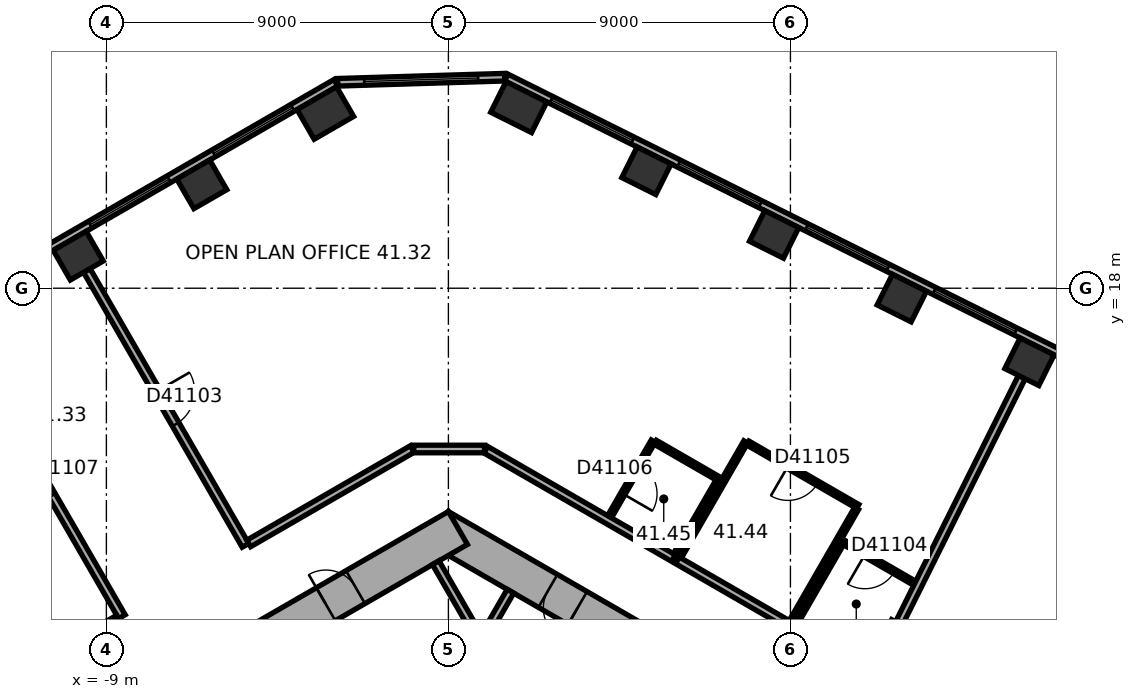
"""IFC4 building model, lengths in metres.
Left out: names, types, materials, properties, quantities, classifications, styles, units other than length and angle.
Written with IfcOpenShell. Run it as: python <this file> out.ifc"""

import sys

from ifc_helpers import new_model, si_unit, direction, frame, frame_2d, origin, origin_2d, place, context, subcontext, project, spatial, rectangle, extrude, element, fill, save


model = new_model("IFC4")
c1 = context("Model", 3, precision=1e-05, world=origin(), true_north=direction((0.0, 1.0)))
c2 = subcontext(c1, "Body", "Model", "MODEL_VIEW")
j1 = project(units=[si_unit("LENGTHUNIT", "METRE"), si_unit("PLANEANGLEUNIT", "RADIAN")], contexts=[c1])
p1 = place(None, origin())
s1 = spatial("IfcSite", under=j1, at=p1, CompositionType="ELEMENT")
p2 = place(p1, origin())
s2 = spatial("IfcBuilding", under=s1, at=p2, CompositionType="ELEMENT")
p3 = place(p2, frame((0.0, 0.0, 168.8)))
s3 = spatial("IfcBuildingStorey", under=s2, at=p3, CompositionType="ELEMENT", Elevation=168.8)
for number, where, z_axis, x_axis in (
    (1, (15.29, 16.065, 0.0), (0.0, 0.0, 1.0), (-0.895, 0.446, 0.0)),
    (2, (11.931, 17.74, 0.0), (0.0, 0.0, 1.0), (-0.895, 0.446, 0.0)),
    (3, (8.571, 19.416, 0.0), (0.0, 0.0, 1.0), (-0.895, 0.446, 0.0)),
    (4, (5.211, 21.091, 0.0), (0.0, 0.0, 1.0), (-0.895, 0.446, 0.0)),
):
    element("IfcColumn", number, at=place(p3, frame(where, z_axis=z_axis, x_axis=x_axis)), inside=s3, PredefinedType="COLUMN", context=c2, shape_type="SweptSolid", body=[
        extrude(rectangle(XDim=1.0, YDim=0.9, at=origin_2d()), origin(), (0.0, 0.0, 1.0), 3.7),
    ])
for number, where, z_axis, x_axis in (
    (5, (1.852, 22.766, 0.0), (0.0, 0.0, 1.0), (-0.895, 0.446, 0.0)),
    (6, (-3.238, 22.61, 0.0), (0.0, 0.0, 1.0), (-0.866, -0.5, 0.0)),
):
    element("IfcColumn", number, at=place(p3, frame(where, z_axis=z_axis, x_axis=x_axis)), inside=s3, PredefinedType="COLUMN", context=c2, shape_type="SweptSolid", body=[
        extrude(rectangle(XDim=1.2, YDim=0.9, at=origin_2d()), origin(), (0.0, 0.0, 1.0), 3.7),
    ])
for number, where, z_axis, x_axis in (
    (7, (-6.489, 20.733, 0.0), (0.0, 0.0, 1.0), (-0.866, -0.5, 0.0)),
    (8, (-9.74, 18.856, 0.0), (0.0, 0.0, 1.0), (-0.866, -0.5, 0.0)),
):
    element("IfcColumn", number, at=place(p3, frame(where, z_axis=z_axis, x_axis=x_axis)), inside=s3, PredefinedType="COLUMN", context=c2, shape_type="SweptSolid", body=[
        extrude(rectangle(XDim=1.0, YDim=0.9, at=origin_2d()), origin(), (0.0, 0.0, 1.0), 3.7),
    ])
p4 = place(p3, frame((10.25, 5.629, 0.0), z_axis=(0.0, 0.0, 1.0), x_axis=(-0.866022616891, 0.50000482701, 0.0)))
e9 = element("IfcWall", 9, at=p4, inside=s3, PredefinedType="SHEAR", context=c2, shape_type="SweptSolid", body=[
    extrude(rectangle(XDim=12.125, YDim=1.0, at=frame_2d((6.062, 0.0))), origin(), (0.0, 0.0, 1.0), 3.7),
])
p5 = place(p4, frame((4.012, 0.0, 0.0)))
e10 = element("IfcOpeningElement", 10, at=p5, cuts=e9, PredefinedType="OPENING", context=c2, shape_type="SweptSolid", body=[
    extrude(rectangle(XDim=0.9, YDim=2.1, at=frame_2d((0.45, 1.05))), frame((0.0, 0.51, 0.0), z_axis=(0.0, -1.0, 0.0), x_axis=(1.0, 0.0, 0.0)), (0.0, 0.0, 1.0), 1.02),
])
p6 = place(p4, frame((7.912, 0.0, 0.0)))
e11 = element("IfcOpeningElement", 11, at=p6, cuts=e9, PredefinedType="OPENING", context=c2, shape_type="SweptSolid", body=[
    extrude(rectangle(XDim=0.9, YDim=2.1, at=frame_2d((0.45, 1.05))), frame((0.0, 0.51, 0.0), z_axis=(0.0, -1.0, 0.0), x_axis=(1.0, 0.0, 0.0)), (0.0, 0.0, 1.0), 1.02),
])
p7 = place(p3, frame((0.25, 11.691, 0.0), z_axis=(0.0, 0.0, 1.0), x_axis=(-0.866022616891, -0.50000482701, 0.0)))
e12 = element("IfcWall", 12, at=p7, inside=s3, PredefinedType="SHEAR", context=c2, shape_type="SweptSolid", body=[
    extrude(rectangle(XDim=12.125, YDim=1.0, at=frame_2d((6.062, 0.0))), origin(), (0.0, 0.0, 1.0), 3.7),
])
p8 = place(p7, frame((6.262, 0.0, 0.0)))
e13 = element("IfcOpeningElement", 13, at=p8, cuts=e12, PredefinedType="OPENING", context=c2, shape_type="SweptSolid", body=[
    extrude(rectangle(XDim=1.5, YDim=2.1, at=frame_2d((0.75, 1.05))), frame((0.0, 0.51, 0.0), z_axis=(0.0, -1.0, 0.0), x_axis=(1.0, 0.0, 0.0)), (0.0, 0.0, 1.0), 1.02),
])
p9 = place(p7, frame((3.112, 0.0, 0.0)))
e14 = element("IfcOpeningElement", 14, at=p9, cuts=e12, PredefinedType="OPENING", context=c2, shape_type="SweptSolid", body=[
    extrude(rectangle(XDim=0.9, YDim=2.1, at=frame_2d((0.45, 1.05))), frame((0.0, 0.51, 0.0), z_axis=(0.0, -1.0, 0.0), x_axis=(1.0, 0.0, 0.0)), (0.0, 0.0, 1.0), 1.02),
])
p10 = place(p3, frame((19.464, 14.599, 0.0), z_axis=(0.0, 0.0, 1.0), x_axis=(-0.894935755043, 0.446195018289, 0.0)))
e15 = element("IfcWall", 15, at=p10, inside=s3, PredefinedType="STANDARD", context=c2, shape_type="SweptSolid", body=[
    extrude(rectangle(XDim=20.044, YDim=0.2, at=frame_2d((10.022, 0.0))), origin(), (0.0, 0.0, 1.0), 3.7),
])
p11 = place(p10, frame((1.313, 0.0, 0.9)))
e16 = element("IfcOpeningElement", 16, at=p11, cuts=e15, PredefinedType="OPENING", context=c2, shape_type="SweptSolid", body=[
    extrude(rectangle(XDim=2.4, YDim=2.0, at=frame_2d((1.2, 1.0))), frame((0.0, 0.11, 0.0), z_axis=(0.0, -1.0, 0.0), x_axis=(1.0, 0.0, 0.0)), (0.0, 0.0, 1.0), 0.22),
])
p12 = place(p10, frame((5.067, 0.0, 0.9)))
e17 = element("IfcOpeningElement", 17, at=p12, cuts=e15, PredefinedType="OPENING", context=c2, shape_type="SweptSolid", body=[
    extrude(rectangle(XDim=2.4, YDim=2.0, at=frame_2d((1.2, 1.0))), frame((0.0, 0.11, 0.0), z_axis=(0.0, -1.0, 0.0), x_axis=(1.0, 0.0, 0.0)), (0.0, 0.0, 1.0), 0.22),
])
p13 = place(p10, frame((8.821, 0.0, 0.9)))
e18 = element("IfcOpeningElement", 18, at=p13, cuts=e15, PredefinedType="OPENING", context=c2, shape_type="SweptSolid", body=[
    extrude(rectangle(XDim=2.4, YDim=2.0, at=frame_2d((1.2, 1.0))), frame((0.0, 0.11, 0.0), z_axis=(0.0, -1.0, 0.0), x_axis=(1.0, 0.0, 0.0)), (0.0, 0.0, 1.0), 0.22),
])
p14 = place(p10, frame((12.575, 0.0, 0.9)))
e19 = element("IfcOpeningElement", 19, at=p14, cuts=e15, PredefinedType="OPENING", context=c2, shape_type="SweptSolid", body=[
    extrude(rectangle(XDim=2.4, YDim=2.0, at=frame_2d((1.2, 1.0))), frame((0.0, 0.11, 0.0), z_axis=(0.0, -1.0, 0.0), x_axis=(1.0, 0.0, 0.0)), (0.0, 0.0, 1.0), 0.22),
])
p15 = place(p10, frame((16.329, 0.0, 0.9)))
e20 = element("IfcOpeningElement", 20, at=p15, cuts=e15, PredefinedType="OPENING", context=c2, shape_type="SweptSolid", body=[
    extrude(rectangle(XDim=2.4, YDim=2.0, at=frame_2d((1.2, 1.0))), frame((0.0, 0.11, 0.0), z_axis=(0.0, -1.0, 0.0), x_axis=(1.0, 0.0, 0.0)), (0.0, 0.0, 1.0), 0.22),
])
p16 = place(p3, frame((1.479, 23.553, 0.0), z_axis=(0.0, 0.0, 1.0), x_axis=(-0.999534786117, -0.03049936625, 0.0)))
e21 = element("IfcWall", 21, at=p16, inside=s3, PredefinedType="STANDARD", context=c2, shape_type="SweptSolid", body=[
    extrude(rectangle(XDim=4.395, YDim=0.2, at=frame_2d((2.197, 0.0))), origin(), (0.0, 0.0, 1.0), 3.7),
])
p17 = place(p16, frame((0.698, 0.0, 0.9)))
e22 = element("IfcOpeningElement", 22, at=p17, cuts=e21, PredefinedType="OPENING", context=c2, shape_type="SweptSolid", body=[
    extrude(rectangle(XDim=3.0, YDim=2.0, at=frame_2d((1.5, 1.0))), frame((0.0, 0.11, 0.0), z_axis=(0.0, -1.0, 0.0), x_axis=(1.0, 0.0, 0.0)), (0.0, 0.0, 1.0), 0.22),
])
p18 = place(p3, frame((-2.961, 23.405, 0.0), z_axis=(0.0, 0.0, 1.0), x_axis=(-0.866023315909, -0.500003616288, 0.0)))
e23 = element("IfcWall", 23, at=p18, inside=s3, PredefinedType="STANDARD", context=c2, shape_type="SweptSolid", body=[
    extrude(rectangle(XDim=20.044, YDim=0.2, at=frame_2d((10.022, 0.0))), origin(), (0.0, 0.0, 1.0), 3.7),
])
p19 = place(p18, frame((1.314, 0.0, 0.9)))
e24 = element("IfcOpeningElement", 24, at=p19, cuts=e23, PredefinedType="OPENING", context=c2, shape_type="SweptSolid", body=[
    extrude(rectangle(XDim=2.4, YDim=2.0, at=frame_2d((1.2, 1.0))), frame((0.0, 0.11, 0.0), z_axis=(0.0, -1.0, 0.0), x_axis=(1.0, 0.0, 0.0)), (0.0, 0.0, 1.0), 0.22),
])
p20 = place(p18, frame((5.069, 0.0, 0.9)))
e25 = element("IfcOpeningElement", 25, at=p20, cuts=e23, PredefinedType="OPENING", context=c2, shape_type="SweptSolid", body=[
    extrude(rectangle(XDim=2.4, YDim=2.0, at=frame_2d((1.2, 1.0))), frame((0.0, 0.11, 0.0), z_axis=(0.0, -1.0, 0.0), x_axis=(1.0, 0.0, 0.0)), (0.0, 0.0, 1.0), 0.22),
])
p21 = place(p18, frame((8.823, 0.0, 0.9)))
e26 = element("IfcOpeningElement", 26, at=p21, cuts=e23, PredefinedType="OPENING", context=c2, shape_type="SweptSolid", body=[
    extrude(rectangle(XDim=2.4, YDim=2.0, at=frame_2d((1.2, 1.0))), frame((0.0, 0.11, 0.0), z_axis=(0.0, -1.0, 0.0), x_axis=(1.0, 0.0, 0.0)), (0.0, 0.0, 1.0), 0.22),
])
p22 = place(p18, frame((12.577, 0.0, 0.9)))
e27 = element("IfcOpeningElement", 27, at=p22, cuts=e23, PredefinedType="OPENING", context=c2, shape_type="SweptSolid", body=[
    extrude(rectangle(XDim=2.4, YDim=2.0, at=frame_2d((1.2, 1.0))), frame((0.0, 0.11, 0.0), z_axis=(0.0, -1.0, 0.0), x_axis=(1.0, 0.0, 0.0)), (0.0, 0.0, 1.0), 0.22),
])
p23 = place(p18, frame((16.331, 0.0, 0.9)))
e28 = element("IfcOpeningElement", 28, at=p23, cuts=e23, PredefinedType="OPENING", context=c2, shape_type="SweptSolid", body=[
    extrude(rectangle(XDim=2.4, YDim=2.0, at=frame_2d((1.2, 1.0))), frame((0.0, 0.11, 0.0), z_axis=(0.0, -1.0, 0.0), x_axis=(1.0, 0.0, 0.0)), (0.0, 0.0, 1.0), 0.22),
])
p24 = place(p3, frame((0.532, 8.122, 0.0), z_axis=(0.0, 0.0, 1.0), x_axis=(0.500077893725, 0.86598042715, 0.0)))
e29 = element("IfcWall", 29, at=p24, inside=s3, PredefinedType="PARTITIONING", context=c2, shape_type="SweptSolid", body=[
    extrude(rectangle(XDim=2.2, YDim=0.2, at=frame_2d((1.1, 0.0))), origin(), (0.0, 0.0, 1.0), 3.42),
])
p25 = place(p3, frame((0.767, 8.872, 0.0), z_axis=(0.0, 0.0, 1.0), x_axis=(-0.499994660107, 0.866028486751, 0.0)))
e30 = element("IfcWall", 30, at=p25, inside=s3, PredefinedType="PARTITIONING", context=c2, shape_type="SweptSolid", body=[
    extrude(rectangle(XDim=2.2, YDim=0.2, at=frame_2d((1.1, 0.0))), origin(), (0.0, 0.0, 1.0), 3.42),
])
p26 = place(p3, frame((-12.766, 16.589, 0.0), z_axis=(0.0, 0.0, 1.0), x_axis=(0.500010139422, -0.866019549707, 0.0)))
e31 = element("IfcWall", 31, at=p26, inside=s3, PredefinedType="PARTITIONING", context=c2, shape_type="SweptSolid", body=[
    extrude(rectangle(XDim=8.35, YDim=0.2, at=frame_2d((4.175, 0.0))), origin(), (0.0, 0.0, 1.0), 3.42),
])
p27 = place(p26, frame((3.675, 0.0, 0.0)))
e32 = element("IfcOpeningElement", 32, at=p27, cuts=e31, PredefinedType="OPENING", context=c2, shape_type="SweptSolid", body=[
    extrude(rectangle(XDim=1.0, YDim=2.1, at=frame_2d((0.5, 1.05))), frame((0.0, 0.11, 0.0), z_axis=(0.0, -1.0, 0.0), x_axis=(1.0, 0.0, 0.0)), (0.0, 0.0, 1.0), 0.22),
])
p28 = place(p3, frame((-9.515, 18.466, 0.0), z_axis=(0.0, 0.0, 1.0), x_axis=(0.500010139422, -0.866019549707, 0.0)))
e33 = element("IfcWall", 33, at=p28, inside=s3, PredefinedType="PARTITIONING", context=c2, shape_type="SweptSolid", body=[
    extrude(rectangle(XDim=8.35, YDim=0.2, at=frame_2d((4.175, 0.0))), origin(), (0.0, 0.0, 1.0), 2.87),
])
p29 = place(p28, frame((3.675, 0.0, 0.0)))
e34 = element("IfcOpeningElement", 34, at=p29, cuts=e33, PredefinedType="OPENING", context=c2, shape_type="SweptSolid", body=[
    extrude(rectangle(XDim=1.0, YDim=2.1, at=frame_2d((0.5, 1.05))), frame((0.0, 0.11, 0.0), z_axis=(0.0, -1.0, 0.0), x_axis=(1.0, 0.0, 0.0)), (0.0, 0.0, 1.0), 0.22),
])
p30 = place(p3, frame((-8.678, 9.308, 0.0), z_axis=(0.0, 0.0, 1.0), x_axis=(-0.866000359435, -0.500043375578, 0.0)))
e35 = element("IfcWall", 35, at=p30, inside=s3, PredefinedType="PARTITIONING", context=c2, shape_type="SweptSolid", body=[
    extrude(rectangle(XDim=3.161, YDim=0.2, at=frame_2d((1.581, 0.0))), origin(), (0.0, 0.0, 1.0), 3.42),
])
p31 = place(p3, frame((-0.95, 13.77, 0.0), z_axis=(0.0, 0.0, 1.0), x_axis=(-0.866036689987, -0.499980451214, 0.0)))
e36 = element("IfcWall", 36, at=p31, inside=s3, PredefinedType="PARTITIONING", context=c2, shape_type="SweptSolid", body=[
    extrude(rectangle(XDim=4.969, YDim=0.2, at=frame_2d((2.485, 0.0))), origin(), (0.0, 0.0, 1.0), 3.42),
])
p32 = place(p3, frame((0.95, 13.77, 0.0), z_axis=(0.0, 0.0, 1.0), x_axis=(-1.0, 0.0, 0.0)))
e37 = element("IfcWall", 37, at=p32, inside=s3, PredefinedType="PARTITIONING", context=c2, shape_type="SweptSolid", body=[
    extrude(rectangle(XDim=1.86, YDim=0.2, at=frame_2d((0.93, 0.0))), origin(), (0.0, 0.0, 1.0), 3.42),
])
p33 = place(p3, frame((4.24, 11.986, 0.0), z_axis=(0.0, 0.0, 1.0), x_axis=(0.499952165731, 0.866053019151, 0.0)))
e38 = element("IfcWall", 38, at=p33, inside=s3, PredefinedType="PARTITIONING", context=c2, shape_type="SweptSolid", body=[
    extrude(rectangle(XDim=2.3, YDim=0.12, at=frame_2d((1.15, 0.0))), origin(), (0.0, 0.0, 1.0), 3.42),
])
p34 = place(p33, frame((0.7, 0.0, 0.0)))
e39 = element("IfcOpeningElement", 39, at=p34, cuts=e38, PredefinedType="OPENING", context=c2, shape_type="SweptSolid", body=[
    extrude(rectangle(XDim=0.9, YDim=2.1, at=frame_2d((0.45, 1.05))), frame((0.0, 0.07, 0.0), z_axis=(0.0, -1.0, 0.0), x_axis=(1.0, 0.0, 0.0)), (0.0, 0.0, 1.0), 0.14),
])
p35 = place(p3, frame((5.442, 13.948, 0.0), z_axis=(0.0, 0.0, 1.0), x_axis=(0.866043088465, -0.499969367985, 0.0)))
e40 = element("IfcWall", 40, at=p35, inside=s3, PredefinedType="PARTITIONING", context=c2, shape_type="SweptSolid", body=[
    extrude(rectangle(XDim=1.94, YDim=0.12, at=frame_2d((0.97, 0.0))), origin(), (0.0, 0.0, 1.0), 3.42),
])
p36 = place(p3, frame((5.922, 10.899, 0.0), z_axis=(0.0, 0.0, 1.0), x_axis=(-0.866031556924, 0.499989342298, 0.0)))
e41 = element("IfcWall", 41, at=p36, inside=s3, PredefinedType="PARTITIONING", context=c2, shape_type="SweptSolid", body=[
    extrude(rectangle(XDim=5.701, YDim=0.2, at=frame_2d((2.851, 0.0))), origin(), (0.0, 0.0, 1.0), 3.42),
])
p37 = place(p3, frame((6.076, 10.926, 0.0), z_axis=(0.0, 0.0, 1.0), x_axis=(0.500010275428, 0.866019471182, 0.0)))
e42 = element("IfcWall", 42, at=p37, inside=s3, PredefinedType="PARTITIONING", context=c2, shape_type="SweptSolid", body=[
    extrude(rectangle(XDim=3.5, YDim=0.12, at=frame_2d((1.75, 0.0))), origin(), (0.0, 0.0, 1.0), 3.42),
])
p38 = place(p3, frame((7.092, 12.926, 0.0), z_axis=(0.0, 0.0, 1.0), x_axis=(-0.500030632641, -0.866007717299, 0.0)))
e43 = element("IfcWall", 43, at=p38, inside=s3, PredefinedType="PARTITIONING", context=c2, shape_type="SweptSolid", body=[
    extrude(rectangle(XDim=2.24, YDim=0.12, at=frame_2d((1.12, 0.0))), origin(), (0.0, 0.0, 1.0), 3.42),
])
p39 = place(p3, frame((7.878, 13.927, 0.0), z_axis=(0.0, 0.0, 1.0), x_axis=(0.866021245731, -0.500007201891, 0.0)))
e44 = element("IfcWall", 44, at=p39, inside=s3, PredefinedType="PARTITIONING", context=c2, shape_type="SweptSolid", body=[
    extrude(rectangle(XDim=3.34, YDim=0.12, at=frame_2d((1.67, 0.0))), origin(), (0.0, 0.0, 1.0), 3.42),
])
p40 = place(p39, frame((1.22, 0.0, 0.0)))
e45 = element("IfcOpeningElement", 45, at=p40, cuts=e44, PredefinedType="OPENING", context=c2, shape_type="SweptSolid", body=[
    extrude(rectangle(XDim=0.9, YDim=2.1, at=frame_2d((0.45, 1.05))), frame((0.0, 0.07, 0.0), z_axis=(0.0, -1.0, 0.0), x_axis=(1.0, 0.0, 0.0)), (0.0, 0.0, 1.0), 0.14),
])
p41 = place(p3, frame((8.971, 9.139, 0.0), z_axis=(0.0, 0.0, 1.0), x_axis=(-0.866038511948, 0.499977295307, 0.0)))
e46 = element("IfcWall", 46, at=p41, inside=s3, PredefinedType="PARTITIONING", context=c2, shape_type="SweptSolid", body=[
    extrude(rectangle(XDim=3.4, YDim=0.2, at=frame_2d((1.7, 0.0))), origin(), (0.0, 0.0, 1.0), 3.42),
])
p42 = place(p3, frame((9.125, 9.166, 0.0), z_axis=(0.0, 0.0, 1.0), x_axis=(0.500004234368, 0.866022959057, 0.0)))
e47 = element("IfcWall", 47, at=p42, inside=s3, PredefinedType="PARTITIONING", context=c2, shape_type="SweptSolid", body=[
    extrude(rectangle(XDim=2.5, YDim=0.12, at=frame_2d((1.25, 0.0))), origin(), (0.0, 0.0, 1.0), 3.42),
])
p43 = place(p3, frame((10.427, 11.301, 0.0), z_axis=(0.0, 0.0, 1.0), x_axis=(0.866019511163, -0.500010206181, 0.0)))
e48 = element("IfcWall", 48, at=p43, inside=s3, PredefinedType="PARTITIONING", context=c2, shape_type="SweptSolid", body=[
    extrude(rectangle(XDim=2.13, YDim=0.12, at=frame_2d((1.065, 0.0))), origin(), (0.0, 0.0, 1.0), 3.42),
])
p44 = place(p43, frame((0.615, 0.0, 0.0)))
e49 = element("IfcOpeningElement", 49, at=p44, cuts=e48, PredefinedType="OPENING", context=c2, shape_type="SweptSolid", body=[
    extrude(rectangle(XDim=0.9, YDim=2.1, at=frame_2d((0.45, 1.05))), frame((0.0, 0.07, 0.0), z_axis=(0.0, -1.0, 0.0), x_axis=(1.0, 0.0, 0.0)), (0.0, 0.0, 1.0), 0.14),
])
p45 = place(p3, frame((10.74, 12.205, 0.0), z_axis=(0.0, 0.0, 1.0), x_axis=(-0.499978425106, -0.866037859697, 0.0)))
e50 = element("IfcWall", 50, at=p45, inside=s3, PredefinedType="PARTITIONING", context=c2, shape_type="SweptSolid", body=[
    extrude(rectangle(XDim=3.44, YDim=0.12, at=frame_2d((1.72, 0.0))), origin(), (0.0, 0.0, 1.0), 3.42),
])
p46 = place(p3, frame((15.09, 15.663, 0.0), z_axis=(0.0, 0.0, 1.0), x_axis=(-0.446206011687, -0.894930273895, 0.0)))
e51 = element("IfcWall", 51, at=p46, inside=s3, PredefinedType="PARTITIONING", context=c2, shape_type="SweptSolid", body=[
    extrude(rectangle(XDim=8.725, YDim=0.2, at=frame_2d((4.363, 0.0))), origin(), (0.0, 0.0, 1.0), 3.42),
])
p47 = place(p12, origin())
e52 = element("IfcWindow", 52, at=p47, inside=s3, PartitioningType="SINGLE_PANEL", PredefinedType="WINDOW", context=c2, shape_type="SweptSolid", body=[
    extrude(rectangle(XDim=2.4, YDim=2.0, at=frame_2d((1.2, 1.0))), frame((0.0, 0.03, 0.0), z_axis=(0.0, -1.0, 0.0), x_axis=(1.0, 0.0, 0.0)), (0.0, 0.0, 1.0), 0.06),
])
fill(e17, e52)
p48 = place(p13, origin())
e53 = element("IfcWindow", 53, at=p48, inside=s3, PartitioningType="SINGLE_PANEL", PredefinedType="WINDOW", context=c2, shape_type="SweptSolid", body=[
    extrude(rectangle(XDim=2.4, YDim=2.0, at=frame_2d((1.2, 1.0))), frame((0.0, 0.03, 0.0), z_axis=(0.0, -1.0, 0.0), x_axis=(1.0, 0.0, 0.0)), (0.0, 0.0, 1.0), 0.06),
])
fill(e18, e53)
p49 = place(p14, origin())
e54 = element("IfcWindow", 54, at=p49, inside=s3, PartitioningType="SINGLE_PANEL", PredefinedType="WINDOW", context=c2, shape_type="SweptSolid", body=[
    extrude(rectangle(XDim=2.4, YDim=2.0, at=frame_2d((1.2, 1.0))), frame((0.0, 0.03, 0.0), z_axis=(0.0, -1.0, 0.0), x_axis=(1.0, 0.0, 0.0)), (0.0, 0.0, 1.0), 0.06),
])
fill(e19, e54)
p50 = place(p15, origin())
e55 = element("IfcWindow", 55, at=p50, inside=s3, PartitioningType="SINGLE_PANEL", PredefinedType="WINDOW", context=c2, shape_type="SweptSolid", body=[
    extrude(rectangle(XDim=2.4, YDim=2.0, at=frame_2d((1.2, 1.0))), frame((0.0, 0.03, 0.0), z_axis=(0.0, -1.0, 0.0), x_axis=(1.0, 0.0, 0.0)), (0.0, 0.0, 1.0), 0.06),
])
fill(e20, e55)
p51 = place(p17, origin())
e56 = element("IfcWindow", 56, at=p51, inside=s3, PartitioningType="SINGLE_PANEL", PredefinedType="WINDOW", context=c2, shape_type="SweptSolid", body=[
    extrude(rectangle(XDim=3.0, YDim=2.0, at=frame_2d((1.5, 1.0))), frame((0.0, 0.03, 0.0), z_axis=(0.0, -1.0, 0.0), x_axis=(1.0, 0.0, 0.0)), (0.0, 0.0, 1.0), 0.06),
])
fill(e22, e56)
p52 = place(p19, origin())
e57 = element("IfcWindow", 57, at=p52, inside=s3, PartitioningType="SINGLE_PANEL", PredefinedType="WINDOW", context=c2, shape_type="SweptSolid", body=[
    extrude(rectangle(XDim=2.4, YDim=2.0, at=frame_2d((1.2, 1.0))), frame((0.0, 0.03, 0.0), z_axis=(0.0, -1.0, 0.0), x_axis=(1.0, 0.0, 0.0)), (0.0, 0.0, 1.0), 0.06),
])
fill(e24, e57)
p53 = place(p20, origin())
e58 = element("IfcWindow", 58, at=p53, inside=s3, PartitioningType="SINGLE_PANEL", PredefinedType="WINDOW", context=c2, shape_type="SweptSolid", body=[
    extrude(rectangle(XDim=2.4, YDim=2.0, at=frame_2d((1.2, 1.0))), frame((0.0, 0.03, 0.0), z_axis=(0.0, -1.0, 0.0), x_axis=(1.0, 0.0, 0.0)), (0.0, 0.0, 1.0), 0.06),
])
fill(e25, e58)
p54 = place(p6, origin())
e59 = element("IfcDoor", 59, at=p54, inside=s3, OperationType="SINGLE_SWING_LEFT", PredefinedType="DOOR", context=c2, shape_type="SweptSolid", body=[
    extrude(rectangle(XDim=0.9, YDim=2.1, at=frame_2d((0.45, 1.05))), frame((0.0, 0.025, 0.0), z_axis=(0.0, -1.0, 0.0), x_axis=(1.0, 0.0, 0.0)), (0.0, 0.0, 1.0), 0.05),
])
fill(e11, e59)
p55 = place(p9, origin())
e60 = element("IfcDoor", 60, at=p55, inside=s3, OperationType="SINGLE_SWING_LEFT", PredefinedType="DOOR", context=c2, shape_type="SweptSolid", body=[
    extrude(rectangle(XDim=0.9, YDim=2.1, at=frame_2d((0.45, 1.05))), frame((0.0, 0.025, 0.0), z_axis=(0.0, -1.0, 0.0), x_axis=(1.0, 0.0, 0.0)), (0.0, 0.0, 1.0), 0.05),
])
fill(e14, e60)
p56 = place(p29, origin())
e61 = element("IfcDoor", 61, at=p56, inside=s3, OperationType="SINGLE_SWING_LEFT", PredefinedType="DOOR", context=c2, shape_type="SweptSolid", body=[
    extrude(rectangle(XDim=1.0, YDim=2.1, at=frame_2d((0.5, 1.05))), frame((0.0, 0.025, 0.0), z_axis=(0.0, -1.0, 0.0), x_axis=(1.0, 0.0, 0.0)), (0.0, 0.0, 1.0), 0.05),
])
fill(e34, e61)
p57 = place(p44, origin())
e62 = element("IfcDoor", 62, at=p57, inside=s3, OperationType="SINGLE_SWING_LEFT", PredefinedType="DOOR", context=c2, shape_type="SweptSolid", body=[
    extrude(rectangle(XDim=0.9, YDim=2.1, at=frame_2d((0.45, 1.05))), frame((0.0, 0.025, 0.0), z_axis=(0.0, -1.0, 0.0), x_axis=(1.0, 0.0, 0.0)), (0.0, 0.0, 1.0), 0.05),
])
fill(e49, e62)
p58 = place(p40, origin())
e63 = element("IfcDoor", 63, at=p58, inside=s3, OperationType="SINGLE_SWING_LEFT", PredefinedType="DOOR", context=c2, shape_type="SweptSolid", body=[
    extrude(rectangle(XDim=0.9, YDim=2.1, at=frame_2d((0.45, 1.05))), frame((0.0, 0.025, 0.0), z_axis=(0.0, -1.0, 0.0), x_axis=(1.0, 0.0, 0.0)), (0.0, 0.0, 1.0), 0.05),
])
fill(e45, e63)
p59 = place(p34, origin())
e64 = element("IfcDoor", 64, at=p59, inside=s3, OperationType="SINGLE_SWING_LEFT", PredefinedType="DOOR", context=c2, shape_type="SweptSolid", body=[
    extrude(rectangle(XDim=0.9, YDim=2.1, at=frame_2d((0.45, 1.05))), frame((0.0, 0.025, 0.0), z_axis=(0.0, -1.0, 0.0), x_axis=(1.0, 0.0, 0.0)), (0.0, 0.0, 1.0), 0.05),
])
fill(e39, e64)
p60 = place(p27, origin())
e65 = element("IfcDoor", 65, at=p60, inside=s3, OperationType="SINGLE_SWING_LEFT", PredefinedType="DOOR", context=c2, shape_type="SweptSolid", body=[
    extrude(rectangle(XDim=1.0, YDim=2.1, at=frame_2d((0.5, 1.05))), frame((0.0, 0.025, 0.0), z_axis=(0.0, -1.0, 0.0), x_axis=(1.0, 0.0, 0.0)), (0.0, 0.0, 1.0), 0.05),
])
fill(e32, e65)
save(model, sys.argv[1])
